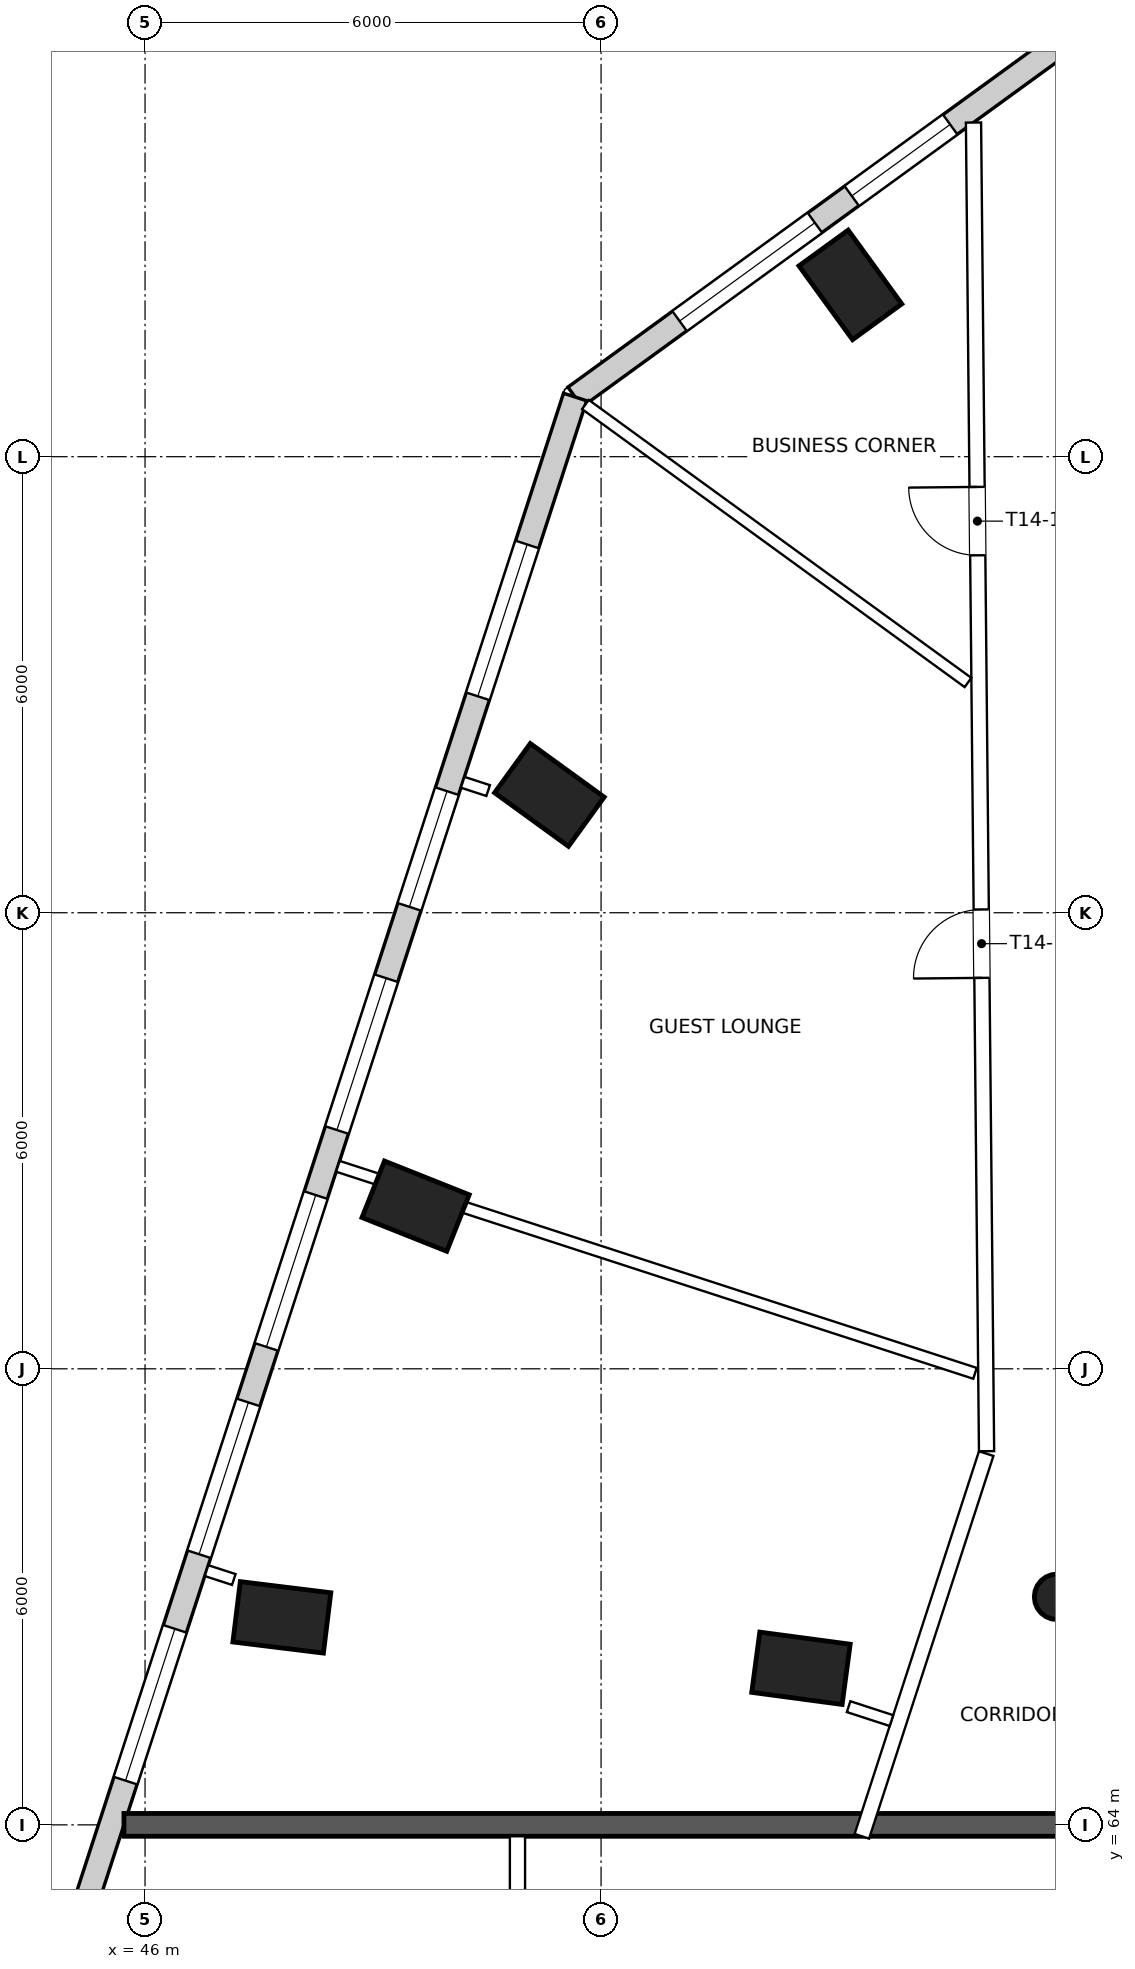
"""IFC4 building model, lengths in metres.
Left out: names, types, materials, properties, quantities, classifications, styles, units other than length and angle.
Written with IfcOpenShell. Run it as: python <this file> out.ifc"""

import sys

from ifc_helpers import new_model, si_unit, direction, frame, frame_2d, origin, origin_2d, place, context, subcontext, project, spatial, rectangle, circle, extrude, element, fill, save


model = new_model("IFC4")
c1 = context("Model", 3, precision=1e-05, world=origin(), true_north=direction((0.0, 1.0)))
c2 = subcontext(c1, "Body", "Model", "MODEL_VIEW")
j1 = project(units=[si_unit("LENGTHUNIT", "METRE"), si_unit("PLANEANGLEUNIT", "RADIAN")], contexts=[c1])
p1 = place(None, origin())
s1 = spatial("IfcSite", under=j1, at=p1, CompositionType="ELEMENT")
p2 = place(p1, origin())
s2 = spatial("IfcBuilding", under=s1, at=p2, CompositionType="ELEMENT")
p3 = place(p2, frame((0.0, 0.0, 204.3)))
s3 = spatial("IfcBuildingStorey", under=s2, at=p3, CompositionType="ELEMENT", Elevation=204.3)
for number, where, z_axis, x_axis in (
    (1, (55.28, 84.26, 0.0), (0.0, 0.0, 1.0), (0.809, 0.588, 0.0)),
    (2, (51.32, 77.55, 0.0), (0.0, 0.0, 1.0), (0.587, 0.81, 0.0)),
    (3, (49.56, 72.14, 0.0), (0.0, 0.0, 1.0), (0.37, 0.929, 0.0)),
    (4, (47.8, 66.73, 0.0), (0.0, 0.0, 1.0), (0.122, 0.993, 0.0)),
    (5, (54.63, 66.06, 0.0), (0.0, 0.0, 1.0), (0.133, 0.991, 0.0)),
):
    element("IfcColumn", number, at=place(p3, frame(where, z_axis=z_axis, x_axis=x_axis)), inside=s3, PredefinedType="COLUMN", context=c2, shape_type="SweptSolid", body=[
        extrude(rectangle(XDim=0.8, YDim=1.2, at=origin_2d()), origin(), (0.0, 0.0, 1.0), 3.9),
    ])
p4 = place(p3, frame((58.0, 67.0, 0.0), z_axis=(0.0, 0.0, 1.0), x_axis=(1.0, 0.0, 0.0)))
e6 = element("IfcColumn", 6, at=p4, inside=s3, PredefinedType="COLUMN", context=c2, shape_type="SweptSolid", body=[
    extrude(circle(Radius=0.3, at=origin_2d()), origin(), (0.0, 0.0, 1.0), 3.9),
])
p5 = place(p3, frame((58.615, 87.84, 0.0), z_axis=(0.0, 0.0, 1.0), x_axis=(-0.809010998506, -0.58779350481, 0.0)))
e7 = element("IfcWall", 7, at=p5, inside=s3, PredefinedType="SOLIDWALL", context=c2, shape_type="SweptSolid", body=[
    extrude(rectangle(XDim=8.599, YDim=0.32, at=frame_2d((4.3, 0.0))), origin(), (0.0, 0.0, 1.0), 3.6),
])
p6 = place(p5, frame((2.5, 0.0, 0.9)))
e8 = element("IfcOpeningElement", 8, at=p6, cuts=e7, PredefinedType="OPENING", context=c2, shape_type="SweptSolid", body=[
    extrude(rectangle(XDim=1.6, YDim=1.8, at=frame_2d((0.8, 0.9))), frame((0.0, 0.17, 0.0), z_axis=(0.0, -1.0, 0.0), x_axis=(1.0, 0.0, 0.0)), (0.0, 0.0, 1.0), 0.34),
])
p7 = place(p5, frame((4.7, 0.0, 0.75)))
e9 = element("IfcOpeningElement", 9, at=p7, cuts=e7, PredefinedType="OPENING", context=c2, shape_type="SweptSolid", body=[
    extrude(rectangle(XDim=2.2, YDim=2.1, at=frame_2d((1.1, 1.05))), frame((0.0, 0.17, 0.0), z_axis=(0.0, -1.0, 0.0), x_axis=(1.0, 0.0, 0.0)), (0.0, 0.0, 1.0), 0.34),
])
p8 = place(p3, frame((51.658, 82.785, 0.0), z_axis=(0.0, 0.0, 1.0), x_axis=(-0.309019087741, -0.951055836117, 0.0)))
e10 = element("IfcWall", 10, at=p8, inside=s3, PredefinedType="SOLIDWALL", context=c2, shape_type="SweptSolid", body=[
    extrude(rectangle(XDim=21.18, YDim=0.32, at=frame_2d((10.59, 0.0))), origin(), (0.0, 0.0, 1.0), 3.6),
])
p9 = place(p8, frame((2.04, 0.0, 0.75)))
e11 = element("IfcOpeningElement", 11, at=p9, cuts=e10, PredefinedType="OPENING", context=c2, shape_type="SweptSolid", body=[
    extrude(rectangle(XDim=2.1, YDim=2.1, at=frame_2d((1.05, 1.05))), frame((0.0, 0.17, 0.0), z_axis=(0.0, -1.0, 0.0), x_axis=(1.0, 0.0, 0.0)), (0.0, 0.0, 1.0), 0.34),
])
p10 = place(p8, frame((5.453, 0.0, 0.9)))
e12 = element("IfcOpeningElement", 12, at=p10, cuts=e10, PredefinedType="OPENING", context=c2, shape_type="SweptSolid", body=[
    extrude(rectangle(XDim=1.6, YDim=1.8, at=frame_2d((0.8, 0.9))), frame((0.0, 0.17, 0.0), z_axis=(0.0, -1.0, 0.0), x_axis=(1.0, 0.0, 0.0)), (0.0, 0.0, 1.0), 0.34),
])
p11 = place(p8, frame((8.04, 0.0, 0.75)))
e13 = element("IfcOpeningElement", 13, at=p11, cuts=e10, PredefinedType="OPENING", context=c2, shape_type="SweptSolid", body=[
    extrude(rectangle(XDim=2.1, YDim=2.1, at=frame_2d((1.05, 1.05))), frame((0.0, 0.17, 0.0), z_axis=(0.0, -1.0, 0.0), x_axis=(1.0, 0.0, 0.0)), (0.0, 0.0, 1.0), 0.34),
])
p12 = place(p8, frame((11.04, 0.0, 0.75)))
e14 = element("IfcOpeningElement", 14, at=p12, cuts=e10, PredefinedType="OPENING", context=c2, shape_type="SweptSolid", body=[
    extrude(rectangle(XDim=2.1, YDim=2.1, at=frame_2d((1.05, 1.05))), frame((0.0, 0.17, 0.0), z_axis=(0.0, -1.0, 0.0), x_axis=(1.0, 0.0, 0.0)), (0.0, 0.0, 1.0), 0.34),
])
p13 = place(p8, frame((13.908, 0.0, 0.75)))
e15 = element("IfcOpeningElement", 15, at=p13, cuts=e10, PredefinedType="OPENING", context=c2, shape_type="SweptSolid", body=[
    extrude(rectangle(XDim=2.1, YDim=2.1, at=frame_2d((1.05, 1.05))), frame((0.0, 0.17, 0.0), z_axis=(0.0, -1.0, 0.0), x_axis=(1.0, 0.0, 0.0)), (0.0, 0.0, 1.0), 0.34),
])
p14 = place(p8, frame((17.04, 0.0, 0.75)))
e16 = element("IfcOpeningElement", 16, at=p14, cuts=e10, PredefinedType="OPENING", context=c2, shape_type="SweptSolid", body=[
    extrude(rectangle(XDim=2.1, YDim=2.1, at=frame_2d((1.05, 1.05))), frame((0.0, 0.17, 0.0), z_axis=(0.0, -1.0, 0.0), x_axis=(1.0, 0.0, 0.0)), (0.0, 0.0, 1.0), 0.34),
])
p15 = place(p3, frame((45.722, 64.0, 0.0), z_axis=(0.0, 0.0, 1.0), x_axis=(1.0, 0.0, 0.0)))
e17 = element("IfcWall", 17, at=p15, inside=s3, PredefinedType="PARTITIONING", context=c2, shape_type="SweptSolid", body=[
    extrude(rectangle(XDim=48.555, YDim=0.3, at=frame_2d((24.278, 0.0))), origin(), (0.0, 0.0, 1.0), 3.05),
])
p16 = place(p15, frame((16.018, 0.0, 0.0)))
e18 = element("IfcOpeningElement", 18, at=p16, cuts=e17, PredefinedType="OPENING", context=c2, shape_type="SweptSolid", body=[
    extrude(rectangle(XDim=2.0, YDim=2.1, at=frame_2d((1.0, 1.05))), frame((0.0, 0.16, 0.0), z_axis=(0.0, -1.0, 0.0), x_axis=(1.0, 0.0, 0.0)), (0.0, 0.0, 1.0), 0.32),
])
p17 = place(p15, frame((30.538, 0.0, 0.0)))
e19 = element("IfcOpeningElement", 19, at=p17, cuts=e17, PredefinedType="OPENING", context=c2, shape_type="SweptSolid", body=[
    extrude(rectangle(XDim=2.0, YDim=2.1, at=frame_2d((1.0, 1.05))), frame((0.0, 0.16, 0.0), z_axis=(0.0, -1.0, 0.0), x_axis=(1.0, 0.0, 0.0)), (0.0, 0.0, 1.0), 0.32),
])
p18 = place(p3, frame((55.431, 63.85, 0.0), z_axis=(0.0, 0.0, 1.0), x_axis=(0.309009941901, 0.951058807754, 0.0)))
e20 = element("IfcWall", 20, at=p18, inside=s3, PredefinedType="PARTITIONING", context=c2, shape_type="SweptSolid", body=[
    extrude(rectangle(XDim=5.293, YDim=0.2, at=frame_2d((2.647, 0.0))), origin(), (0.0, 0.0, 1.0), 3.6),
])
p19 = place(p3, frame((57.072, 68.916, 0.0), z_axis=(0.0, 0.0, 1.0), x_axis=(-0.009846166448, 0.999951525328, 0.0)))
e21 = element("IfcWall", 21, at=p19, inside=s3, PredefinedType="PARTITIONING", context=c2, shape_type="SweptSolid", body=[
    extrude(rectangle(XDim=17.481, YDim=0.2, at=frame_2d((8.74, 0.0))), origin(), (0.0, 0.0, 1.0), 3.15),
])
p20 = place(p19, frame((6.227, 0.0, 0.0)))
e22 = element("IfcOpeningElement", 22, at=p20, cuts=e21, PredefinedType="OPENING", context=c2, shape_type="SweptSolid", body=[
    extrude(rectangle(XDim=0.9, YDim=2.1, at=frame_2d((0.45, 1.05))), frame((0.0, 0.11, 0.0), z_axis=(0.0, -1.0, 0.0), x_axis=(1.0, 0.0, 0.0)), (0.0, 0.0, 1.0), 0.22),
])
p21 = place(p19, frame((11.787, 0.0, 0.0)))
e23 = element("IfcOpeningElement", 23, at=p21, cuts=e21, PredefinedType="OPENING", context=c2, shape_type="SweptSolid", body=[
    extrude(rectangle(XDim=0.9, YDim=2.1, at=frame_2d((0.45, 1.05))), frame((0.0, 0.11, 0.0), z_axis=(0.0, -1.0, 0.0), x_axis=(1.0, 0.0, 0.0)), (0.0, 0.0, 1.0), 0.22),
])
p22 = place(p3, frame((50.9, 55.9, 0.0), z_axis=(0.0, 0.0, 1.0), x_axis=(0.0, 1.0, 0.0)))
e24 = element("IfcWall", 24, at=p22, inside=s3, PredefinedType="PARTITIONING", context=c2, shape_type="SweptSolid", body=[
    extrude(rectangle(XDim=7.95, YDim=0.2, at=frame_2d((3.975, 0.0))), origin(), (0.0, 0.0, 1.0), 3.15),
])
p23 = place(p22, frame((2.614, 0.0, 0.0)))
e25 = element("IfcOpeningElement", 25, at=p23, cuts=e24, PredefinedType="OPENING", context=c2, shape_type="SweptSolid", body=[
    extrude(rectangle(XDim=0.9, YDim=2.1, at=frame_2d((0.45, 1.05))), frame((0.0, 0.11, 0.0), z_axis=(0.0, -1.0, 0.0), x_axis=(1.0, 0.0, 0.0)), (0.0, 0.0, 1.0), 0.22),
])
p24 = place(p3, frame((51.794, 82.687, 0.0), z_axis=(0.0, 0.0, 1.0), x_axis=(0.809027823237, -0.587770347354, 0.0)))
e26 = element("IfcWall", 26, at=p24, inside=s3, PredefinedType="PARTITIONING", context=c2, shape_type="SweptSolid", body=[
    extrude(rectangle(XDim=6.222, YDim=0.15, at=frame_2d((3.111, 0.0))), origin(), (0.0, 0.0, 1.0), 3.15),
])
p25 = place(p3, frame((48.538, 72.664, 0.0), z_axis=(0.0, 0.0, 1.0), x_axis=(0.951054829907, -0.309022184495, 0.0)))
e27 = element("IfcWall", 27, at=p25, inside=s3, PredefinedType="PARTITIONING", context=c2, shape_type="SweptSolid", body=[
    extrude(rectangle(XDim=8.814, YDim=0.15, at=frame_2d((4.407, 0.0))), origin(), (0.0, 0.0, 1.0), 3.6),
])
p26 = place(p3, frame((50.514, 77.607, 0.0), z_axis=(0.0, 0.0, 1.0), x_axis=(-0.951079872945, 0.308945100753, 0.0)))
e28 = element("IfcWall", 28, at=p26, inside=s3, PredefinedType="PARTITIONING", context=c2, shape_type="SweptSolid", body=[
    extrude(rectangle(XDim=0.353, YDim=0.15, at=frame_2d((0.176, 0.0))), origin(), (0.0, 0.0, 1.0), 3.6),
])
p27 = place(p3, frame((47.168, 67.228, 0.0), z_axis=(0.0, 0.0, 1.0), x_axis=(-0.95111492259, 0.308837180446, 0.0)))
e29 = element("IfcWall", 29, at=p27, inside=s3, PredefinedType="PARTITIONING", context=c2, shape_type="SweptSolid", body=[
    extrude(rectangle(XDim=0.377, YDim=0.15, at=frame_2d((0.188, 0.0))), origin(), (0.0, 0.0, 1.0), 3.6),
])
p28 = place(p3, frame((55.257, 65.555, 0.0), z_axis=(0.0, 0.0, 1.0), x_axis=(0.9510855144, -0.308927733131, 0.0)))
e30 = element("IfcWall", 30, at=p28, inside=s3, PredefinedType="PARTITIONING", context=c2, shape_type="SweptSolid", body=[
    extrude(rectangle(XDim=0.593, YDim=0.15, at=frame_2d((0.296, 0.0))), origin(), (0.0, 0.0, 1.0), 3.6),
])
p29 = place(p6, origin())
e31 = element("IfcWindow", 31, at=p29, inside=s3, PartitioningType="SINGLE_PANEL", PredefinedType="WINDOW", context=c2, shape_type="SweptSolid", body=[
    extrude(rectangle(XDim=1.6, YDim=1.8, at=frame_2d((0.8, 0.9))), frame((0.0, 0.07, 0.0), z_axis=(0.0, -1.0, 0.0), x_axis=(1.0, 0.0, 0.0)), (0.0, 0.0, 1.0), 0.06),
])
fill(e8, e31)
p30 = place(p7, origin())
e32 = element("IfcWindow", 32, at=p30, inside=s3, PartitioningType="SINGLE_PANEL", PredefinedType="WINDOW", context=c2, shape_type="SweptSolid", body=[
    extrude(rectangle(XDim=2.2, YDim=2.1, at=frame_2d((1.1, 1.05))), frame((0.0, 0.07, 0.0), z_axis=(0.0, -1.0, 0.0), x_axis=(1.0, 0.0, 0.0)), (0.0, 0.0, 1.0), 0.06),
])
fill(e9, e32)
p31 = place(p9, origin())
e33 = element("IfcWindow", 33, at=p31, inside=s3, PartitioningType="SINGLE_PANEL", PredefinedType="WINDOW", context=c2, shape_type="SweptSolid", body=[
    extrude(rectangle(XDim=2.1, YDim=2.1, at=frame_2d((1.05, 1.05))), frame((0.0, 0.07, 0.0), z_axis=(0.0, -1.0, 0.0), x_axis=(1.0, 0.0, 0.0)), (0.0, 0.0, 1.0), 0.06),
])
fill(e11, e33)
p32 = place(p10, origin())
e34 = element("IfcWindow", 34, at=p32, inside=s3, PartitioningType="SINGLE_PANEL", PredefinedType="WINDOW", context=c2, shape_type="SweptSolid", body=[
    extrude(rectangle(XDim=1.6, YDim=1.8, at=frame_2d((0.8, 0.9))), frame((0.0, 0.07, 0.0), z_axis=(0.0, -1.0, 0.0), x_axis=(1.0, 0.0, 0.0)), (0.0, 0.0, 1.0), 0.06),
])
fill(e12, e34)
p33 = place(p11, origin())
e35 = element("IfcWindow", 35, at=p33, inside=s3, PartitioningType="SINGLE_PANEL", PredefinedType="WINDOW", context=c2, shape_type="SweptSolid", body=[
    extrude(rectangle(XDim=2.1, YDim=2.1, at=frame_2d((1.05, 1.05))), frame((0.0, 0.07, 0.0), z_axis=(0.0, -1.0, 0.0), x_axis=(1.0, 0.0, 0.0)), (0.0, 0.0, 1.0), 0.06),
])
fill(e13, e35)
p34 = place(p12, origin())
e36 = element("IfcWindow", 36, at=p34, inside=s3, PartitioningType="SINGLE_PANEL", PredefinedType="WINDOW", context=c2, shape_type="SweptSolid", body=[
    extrude(rectangle(XDim=2.1, YDim=2.1, at=frame_2d((1.05, 1.05))), frame((0.0, 0.07, 0.0), z_axis=(0.0, -1.0, 0.0), x_axis=(1.0, 0.0, 0.0)), (0.0, 0.0, 1.0), 0.06),
])
fill(e14, e36)
p35 = place(p13, origin())
e37 = element("IfcWindow", 37, at=p35, inside=s3, PartitioningType="SINGLE_PANEL", PredefinedType="WINDOW", context=c2, shape_type="SweptSolid", body=[
    extrude(rectangle(XDim=2.1, YDim=2.1, at=frame_2d((1.05, 1.05))), frame((0.0, 0.07, 0.0), z_axis=(0.0, -1.0, 0.0), x_axis=(1.0, 0.0, 0.0)), (0.0, 0.0, 1.0), 0.06),
])
fill(e15, e37)
p36 = place(p14, origin())
e38 = element("IfcWindow", 38, at=p36, inside=s3, PartitioningType="SINGLE_PANEL", PredefinedType="WINDOW", context=c2, shape_type="SweptSolid", body=[
    extrude(rectangle(XDim=2.1, YDim=2.1, at=frame_2d((1.05, 1.05))), frame((0.0, 0.07, 0.0), z_axis=(0.0, -1.0, 0.0), x_axis=(1.0, 0.0, 0.0)), (0.0, 0.0, 1.0), 0.06),
])
fill(e16, e38)
p37 = place(p20, origin())
e39 = element("IfcDoor", 39, at=p37, inside=s3, OperationType="SINGLE_SWING_LEFT", PredefinedType="DOOR", context=c2, shape_type="SweptSolid", body=[
    extrude(rectangle(XDim=0.9, YDim=2.1, at=frame_2d((0.45, 1.05))), frame((0.0, 0.025, 0.0), z_axis=(0.0, -1.0, 0.0), x_axis=(1.0, 0.0, 0.0)), (0.0, 0.0, 1.0), 0.05),
])
fill(e22, e39)
p38 = place(p21, origin())
e40 = element("IfcDoor", 40, at=p38, inside=s3, OperationType="SINGLE_SWING_RIGHT", PredefinedType="DOOR", context=c2, shape_type="SweptSolid", body=[
    extrude(rectangle(XDim=0.9, YDim=2.1, at=frame_2d((0.45, 1.05))), frame((0.0, 0.025, 0.0), z_axis=(0.0, -1.0, 0.0), x_axis=(1.0, 0.0, 0.0)), (0.0, 0.0, 1.0), 0.05),
])
fill(e23, e40)
save(model, sys.argv[1])
